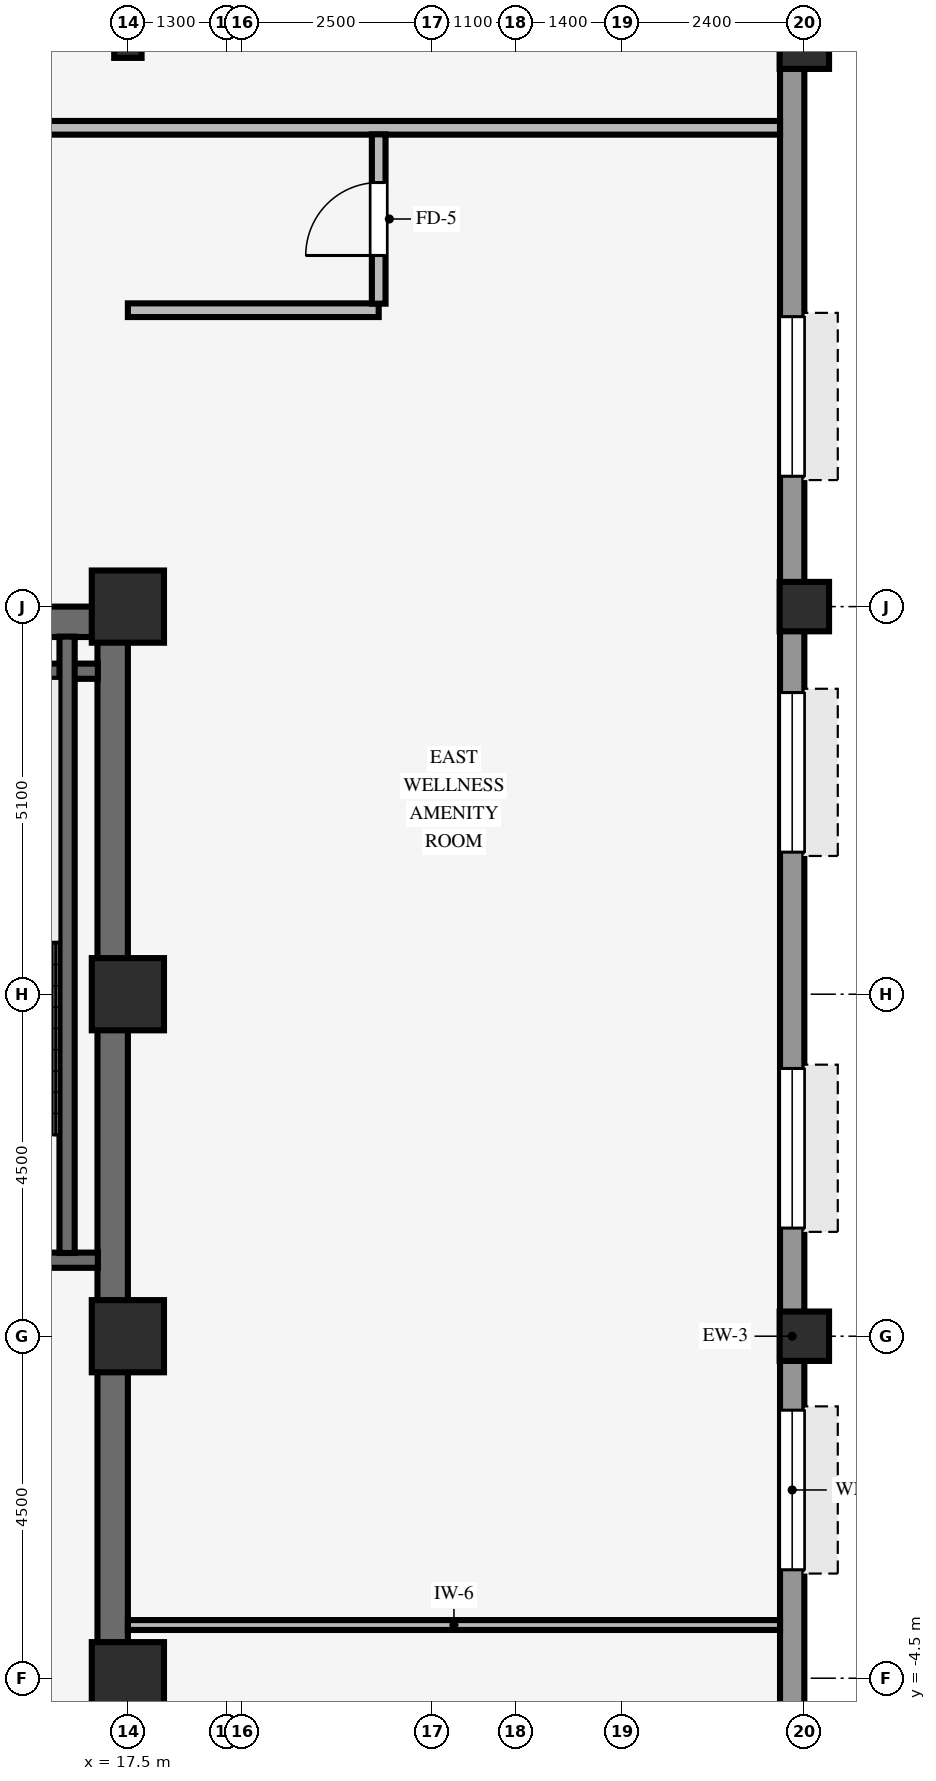
"""IFC4 building model, lengths in metres.
Left out: names, types, materials, properties, quantities, classifications, styles, units other than length and angle.
Written with IfcOpenShell. Run it as: python <this file> out.ifc"""

import sys

from ifc_helpers import new_model, si_unit, direction, frame, frame_2d, origin, origin_2d, place, context, subcontext, project, spatial, rectangle, hollow_rectangle, i_section, extrude, source, transform, mapped, element, fill, save


model = new_model("IFC4")
c1 = context("Model", 3, precision=1e-05, world=origin(), true_north=direction((0.0, 1.0)))
c2 = subcontext(c1, "Body", "Model", "MODEL_VIEW")
j1 = project(units=[si_unit("LENGTHUNIT", "METRE"), si_unit("PLANEANGLEUNIT", "RADIAN")], contexts=[c1])
p1 = place(None, origin())
s1 = spatial("IfcSite", under=j1, at=p1, CompositionType="ELEMENT")
p2 = place(p1, origin())
s2 = spatial("IfcBuilding", under=s1, at=p2, CompositionType="ELEMENT")
p3 = place(p2, frame((0.0, 0.0, 134.8)))
s3 = spatial("IfcBuildingStorey", under=s2, at=p3, CompositionType="ELEMENT", Elevation=134.8)
p4 = place(p3, frame((9.0, 9.4, 0.0), z_axis=(0.0, 0.0, 1.0), x_axis=(1.0, 0.0, 0.0)))
e1 = element("IfcWall", 1, at=p4, inside=s3, PredefinedType="SHEAR", context=c2, shape_type="SweptSolid", body=[
    extrude(rectangle(XDim=8.5, YDim=0.4, at=frame_2d((4.25, 0.0))), origin(), (0.0, 0.0, 1.0), 3.37),
])
p5 = place(p3, frame((17.3, -9.205, 0.0), z_axis=(0.0, 0.0, 1.0), x_axis=(0.0, 1.0, 0.0)))
e2 = element("IfcWall", 2, at=p5, inside=s3, PredefinedType="SHEAR", context=c2, shape_type="SweptSolid", body=[
    extrude(rectangle(XDim=18.41, YDim=0.4, at=frame_2d((9.205, 0.0))), origin(), (0.0, 0.0, 1.0), 3.37),
])
for number, where, z_axis, x_axis in (
    (3, (17.5, -4.5, 0.0), (0.0, 0.0, 1.0), (1.0, 0.0, 0.0)),
    (4, (17.5, 4.5, 0.0), (0.0, 0.0, 1.0), (1.0, 0.0, 0.0)),
    (5, (17.5, 9.6, 0.0), (0.0, 0.0, 1.0), (1.0, 0.0, 0.0)),
    (6, (17.5, 0.0, 0.0), (0.0, 0.0, 1.0), (1.0, 0.0, 0.0)),
):
    element("IfcColumn", number, at=place(p3, frame(where, z_axis=z_axis, x_axis=x_axis)), inside=s3, PredefinedType="COLUMN", context=c2, shape_type="SweptSolid", body=[
        extrude(rectangle(XDim=0.95, YDim=0.95, at=origin_2d()), origin(), (0.0, 0.0, 1.0), 3.37),
    ])
for number, where, z_axis, x_axis in (
    (7, (26.4, 0.0, 0.0), (0.0, 0.0, 1.0), (1.0, 0.0, 0.0)),
    (8, (26.4, 9.6, 0.0), (0.0, 0.0, 1.0), (1.0, 0.0, 0.0)),
    (9, (26.4, 17.0, 0.0), (0.0, 0.0, 1.0), (1.0, 0.0, 0.0)),
):
    element("IfcColumn", number, at=place(p3, frame(where, z_axis=z_axis, x_axis=x_axis)), inside=s3, PredefinedType="COLUMN", context=c2, shape_type="SweptSolid", body=[
        extrude(hollow_rectangle(XDim=0.65, YDim=0.65, WallThickness=0.04, InnerFilletRadius=0.04, OuterFilletRadius=0.08, at=origin_2d()), origin(), (0.0, 0.0, 1.0), 3.37),
    ])
p6 = place(p3, frame((17.5, 17.0, 0.0), z_axis=(0.0, 0.0, 1.0), x_axis=(1.0, 0.0, 0.0)))
e10 = element("IfcColumn", 10, at=p6, inside=s3, PredefinedType="COLUMN", context=c2, shape_type="SweptSolid", body=[
    extrude(i_section(OverallWidth=0.36, OverallDepth=0.36, WebThickness=0.021, FlangeThickness=0.021, FilletRadius=0.018, at=origin_2d()), origin(), (0.0, 0.0, 1.0), 3.37),
])
p7 = place(p3, frame((26.24, -20.784, 0.0), z_axis=(0.0, 0.0, 1.0), x_axis=(0.0, 1.0, 0.0)))
e11 = element("IfcWall", 11, at=p7, inside=s3, PredefinedType="STANDARD", context=c2, shape_type="SweptSolid", body=[
    extrude(rectangle(XDim=41.568, YDim=0.32, at=frame_2d((20.784, 0.0))), origin(), (0.0, 0.0, 1.0), 2.705),
])
p8 = place(p7, frame((7.369, 0.0, 0.8)))
e12 = element("IfcOpeningElement", 12, at=p8, cuts=e11, PredefinedType="OPENING", context=c2, shape_type="SweptSolid", body=[
    extrude(rectangle(XDim=2.1, YDim=1.56, at=frame_2d((1.05, 0.78))), frame((0.0, 0.17, 0.0), z_axis=(0.0, -1.0, 0.0), x_axis=(1.0, 0.0, 0.0)), (0.0, 0.0, 1.0), 0.34),
])
p9 = place(p7, frame((12.315, 0.0, 0.8)))
e13 = element("IfcOpeningElement", 13, at=p9, cuts=e11, PredefinedType="OPENING", context=c2, shape_type="SweptSolid", body=[
    extrude(rectangle(XDim=2.1, YDim=1.56, at=frame_2d((1.05, 0.78))), frame((0.0, 0.17, 0.0), z_axis=(0.0, -1.0, 0.0), x_axis=(1.0, 0.0, 0.0)), (0.0, 0.0, 1.0), 0.34),
])
p10 = place(p7, frame((17.711, 0.0, 0.8)))
e14 = element("IfcOpeningElement", 14, at=p10, cuts=e11, PredefinedType="OPENING", context=c2, shape_type="SweptSolid", body=[
    extrude(rectangle(XDim=2.1, YDim=1.56, at=frame_2d((1.05, 0.78))), frame((0.0, 0.17, 0.0), z_axis=(0.0, -1.0, 0.0), x_axis=(1.0, 0.0, 0.0)), (0.0, 0.0, 1.0), 0.34),
])
p11 = place(p7, frame((22.207, 0.0, 0.8)))
e15 = element("IfcOpeningElement", 15, at=p11, cuts=e11, PredefinedType="OPENING", context=c2, shape_type="SweptSolid", body=[
    extrude(rectangle(XDim=2.1, YDim=1.56, at=frame_2d((1.05, 0.78))), frame((0.0, 0.17, 0.0), z_axis=(0.0, -1.0, 0.0), x_axis=(1.0, 0.0, 0.0)), (0.0, 0.0, 1.0), 0.34),
])
p12 = place(p7, frame((27.153, 0.0, 0.8)))
e16 = element("IfcOpeningElement", 16, at=p12, cuts=e11, PredefinedType="OPENING", context=c2, shape_type="SweptSolid", body=[
    extrude(rectangle(XDim=2.1, YDim=1.56, at=frame_2d((1.05, 0.78))), frame((0.0, 0.17, 0.0), z_axis=(0.0, -1.0, 0.0), x_axis=(1.0, 0.0, 0.0)), (0.0, 0.0, 1.0), 0.34),
])
p13 = place(p7, frame((32.099, 0.0, 0.8)))
e17 = element("IfcOpeningElement", 17, at=p13, cuts=e11, PredefinedType="OPENING", context=c2, shape_type="SweptSolid", body=[
    extrude(rectangle(XDim=2.1, YDim=1.56, at=frame_2d((1.05, 0.78))), frame((0.0, 0.17, 0.0), z_axis=(0.0, -1.0, 0.0), x_axis=(1.0, 0.0, 0.0)), (0.0, 0.0, 1.0), 0.34),
])
for number, where, z_axis, x_axis in (
    (18, (13.535, 1.0, 0.0), (0.0, 0.0, 1.0), (1.0, 0.0, 0.0)),
    (19, (13.535, 8.75, 0.0), (0.0, 0.0, 1.0), (1.0, 0.0, 0.0)),
):
    element("IfcWall", number, at=place(p3, frame(where, z_axis=z_axis, x_axis=x_axis)), inside=s3, PredefinedType="SHEAR", context=c2, shape_type="SweptSolid", body=[
        extrude(rectangle(XDim=3.57, YDim=0.2, at=frame_2d((1.785, 0.0))), origin(), (0.0, 0.0, 1.0), 3.37),
    ])
p14 = place(p3, frame((16.7, 1.095, 0.0), z_axis=(0.0, 0.0, 1.0), x_axis=(0.0, 1.0, 0.0)))
e20 = element("IfcWall", 20, at=p14, inside=s3, PredefinedType="SHEAR", context=c2, shape_type="SweptSolid", body=[
    extrude(rectangle(XDim=8.11, YDim=0.2, at=frame_2d((4.055, 0.0))), origin(), (0.0, 0.0, 1.0), 3.37),
])
p15 = place(p3, frame((17.5, -3.8, 0.0), z_axis=(0.0, 0.0, 1.0), x_axis=(1.0, 0.0, 0.0)))
e21 = element("IfcWall", 21, at=p15, inside=s3, PredefinedType="PARTITIONING", context=c2, shape_type="SweptSolid", body=[
    extrude(rectangle(XDim=8.58, YDim=0.13, at=frame_2d((4.29, 0.0))), origin(), (0.0, 0.0, 1.0), 3.36),
])
p16 = place(p3, frame((17.5, 13.5, 0.0), z_axis=(0.0, 0.0, 1.0), x_axis=(1.0, 0.0, 0.0)))
e22 = element("IfcWall", 22, at=p16, inside=s3, PredefinedType="PARTITIONING", context=c2, shape_type="SweptSolid", body=[
    extrude(rectangle(XDim=3.3, YDim=0.18, at=frame_2d((1.65, 0.0))), origin(), (0.0, 0.0, 1.0), 2.998),
])
p17 = place(p3, frame((-26.08, 15.9, 0.0), z_axis=(0.0, 0.0, 1.0), x_axis=(1.0, 0.0, 0.0)))
e23 = element("IfcWall", 23, at=p17, inside=s3, PredefinedType="PARTITIONING", context=c2, shape_type="SweptSolid", body=[
    extrude(rectangle(XDim=52.16, YDim=0.18, at=frame_2d((26.08, 0.0))), origin(), (0.0, 0.0, 1.0), 3.36),
])
p18 = place(p17, frame((18.3, 0.0, 0.0)))
e24 = element("IfcOpeningElement", 24, at=p18, cuts=e23, PredefinedType="OPENING", context=c2, shape_type="SweptSolid", body=[
    extrude(rectangle(XDim=0.96, YDim=2.1, at=frame_2d((0.48, 1.05))), frame((0.0, 0.1, 0.0), z_axis=(0.0, -1.0, 0.0), x_axis=(1.0, 0.0, 0.0)), (0.0, 0.0, 1.0), 0.2),
])
p19 = place(p17, frame((40.5, 0.0, 0.0)))
e25 = element("IfcOpeningElement", 25, at=p19, cuts=e23, PredefinedType="OPENING", context=c2, shape_type="SweptSolid", body=[
    extrude(rectangle(XDim=0.96, YDim=2.1, at=frame_2d((0.48, 1.05))), frame((0.0, 0.1, 0.0), z_axis=(0.0, -1.0, 0.0), x_axis=(1.0, 0.0, 0.0)), (0.0, 0.0, 1.0), 0.2),
])
p20 = place(p3, frame((20.8, 13.586, 0.0), z_axis=(0.0, 0.0, 1.0), x_axis=(0.0, 1.0, 0.0)))
e26 = element("IfcWall", 26, at=p20, inside=s3, PredefinedType="PARTITIONING", context=c2, shape_type="SweptSolid", body=[
    extrude(rectangle(XDim=2.228, YDim=0.18, at=frame_2d((1.114, 0.0))), origin(), (0.0, 0.0, 1.0), 3.36),
])
p21 = place(p20, frame((0.634, 0.0, 0.0)))
e27 = element("IfcOpeningElement", 27, at=p21, cuts=e26, PredefinedType="OPENING", context=c2, shape_type="SweptSolid", body=[
    extrude(rectangle(XDim=0.96, YDim=2.1, at=frame_2d((0.48, 1.05))), frame((0.0, 0.1, 0.0), z_axis=(0.0, -1.0, 0.0), x_axis=(1.0, 0.0, 0.0)), (0.0, 0.0, 1.0), 0.2),
])
m1 = source(origin(), c2, "Body", "SweptSolid", [
    extrude(rectangle(XDim=2.1, YDim=1.56, at=frame_2d((1.05, 0.78))), frame((0.0, 0.03, 0.0), z_axis=(0.0, -1.0, 0.0), x_axis=(1.0, 0.0, 0.0)), (0.0, 0.0, 1.0), 0.06),
])
p22 = place(p10, origin())
e28 = element("IfcWindow", 28, at=p22, inside=s3, PartitioningType="SINGLE_PANEL", PredefinedType="WINDOW", context=c2, shape_type="MappedRepresentation", body=[
    mapped(m1, transform((0.0, 0.0, 0.0), scale=1.0)),
])
fill(e14, e28)
p23 = place(p11, origin())
e29 = element("IfcWindow", 29, at=p23, inside=s3, PartitioningType="SINGLE_PANEL", PredefinedType="WINDOW", context=c2, shape_type="MappedRepresentation", body=[
    mapped(m1, transform((0.0, 0.0, 0.0), scale=1.0)),
])
fill(e15, e29)
p24 = place(p12, origin())
e30 = element("IfcWindow", 30, at=p24, inside=s3, PartitioningType="SINGLE_PANEL", PredefinedType="WINDOW", context=c2, shape_type="MappedRepresentation", body=[
    mapped(m1, transform((0.0, 0.0, 0.0), scale=1.0)),
])
fill(e16, e30)
p25 = place(p13, origin())
e31 = element("IfcWindow", 31, at=p25, inside=s3, PartitioningType="SINGLE_PANEL", PredefinedType="WINDOW", context=c2, shape_type="MappedRepresentation", body=[
    mapped(m1, transform((0.0, 0.0, 0.0), scale=1.0)),
])
fill(e17, e31)
m2 = source(origin(), c2, "Body", "SweptSolid", [
    extrude(rectangle(XDim=0.96, YDim=2.1, at=frame_2d((0.48, 1.05))), frame((0.0, 0.025, 0.0), z_axis=(0.0, -1.0, 0.0), x_axis=(1.0, 0.0, 0.0)), (0.0, 0.0, 1.0), 0.05),
])
p26 = place(p21, origin())
e32 = element("IfcDoor", 32, at=p26, inside=s3, OperationType="SINGLE_SWING_LEFT", PredefinedType="DOOR", context=c2, shape_type="MappedRepresentation", body=[
    mapped(m2, transform((0.0, 0.0, 0.0), scale=1.0)),
])
fill(e27, e32)
save(model, sys.argv[1])
